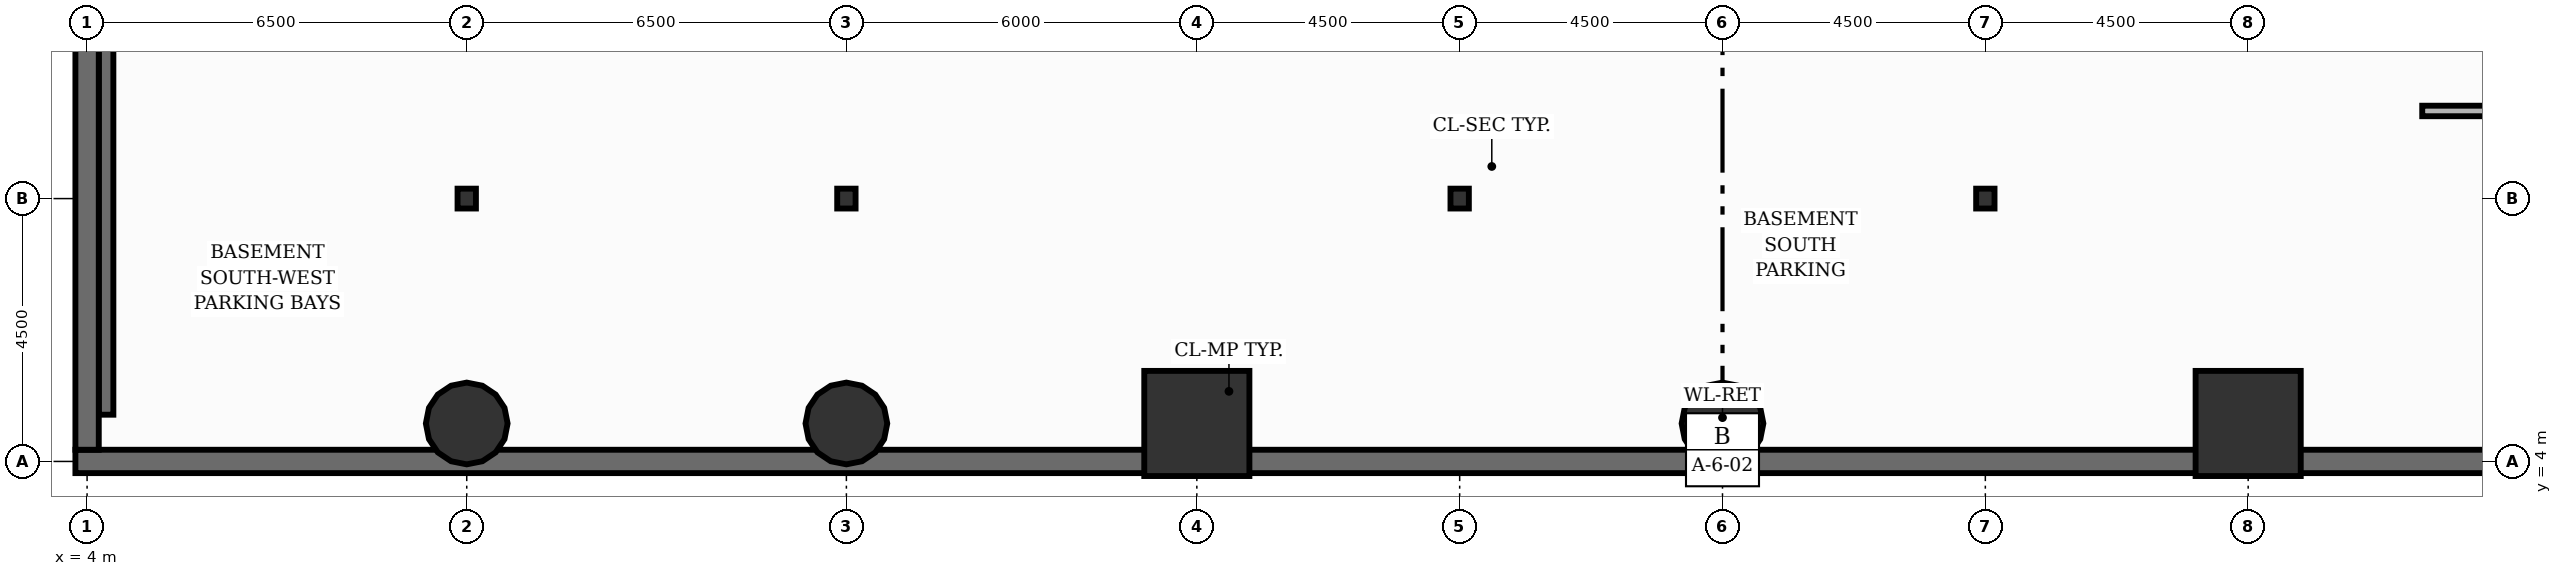
"""IFC4 building model, lengths in metres.
Left out: names, types, materials, properties, quantities, classifications, styles, units other than length and angle.
Written with IfcOpenShell. Run it as: python <this file> out.ifc"""

import sys

from ifc_helpers import new_model, si_unit, direction, frame, frame_2d, origin, origin_2d, place, context, subcontext, project, spatial, rectangle, circle, i_section, extrude, element, save


model = new_model("IFC4")
c1 = context("Model", 3, precision=1e-05, world=origin(), true_north=direction((0.0, 1.0)))
c2 = subcontext(c1, "Body", "Model", "MODEL_VIEW")
j1 = project(units=[si_unit("LENGTHUNIT", "METRE"), si_unit("PLANEANGLEUNIT", "RADIAN")], contexts=[c1])
p1 = place(None, origin())
s1 = spatial("IfcSite", under=j1, at=p1, CompositionType="ELEMENT")
p2 = place(p1, origin())
s2 = spatial("IfcBuilding", under=s1, at=p2, CompositionType="ELEMENT")
p3 = place(p2, frame((0.0, 0.0, -9.0)))
s3 = spatial("IfcBuildingStorey", under=s2, at=p3, CompositionType="ELEMENT", Elevation=-9.0)
p4 = place(p3, frame((4.325, 4.8, 0.0), z_axis=(0.0, 0.0, 1.0), x_axis=(0.0, 1.0, 0.0)))
e1 = element("IfcWall", 1, at=p4, inside=s3, PredefinedType="SHEAR", context=c2, shape_type="SweptSolid", body=[
    extrude(rectangle(XDim=37.9, YDim=0.25, at=frame_2d((18.95, 0.0))), origin(), (0.0, 0.0, 1.0), 4.5),
])
p5 = place(p3, frame((3.8, 4.0, 0.0), z_axis=(0.0, 0.0, 1.0), x_axis=(1.0, 0.0, 0.0)))
e2 = element("IfcWall", 2, at=p5, inside=s3, PredefinedType="USERDEFINED", context=c2, shape_type="SweptSolid", body=[
    extrude(rectangle(XDim=56.4, YDim=0.4, at=frame_2d((28.2, 0.0))), origin(), (0.0, 0.0, 1.0), 4.5),
])
p6 = place(p3, frame((4.0, 4.2, 0.0), z_axis=(0.0, 0.0, 1.0), x_axis=(0.0, 1.0, 0.0)))
e3 = element("IfcWall", 3, at=p6, inside=s3, PredefinedType="USERDEFINED", context=c2, shape_type="SweptSolid", body=[
    extrude(rectangle(XDim=39.6, YDim=0.4, at=frame_2d((19.8, 0.0))), origin(), (0.0, 0.0, 1.0), 4.5),
])
for number, where, z_axis, x_axis in (
    (4, (10.5, 4.65, 0.0), (0.0, 0.0, 1.0), (1.0, 0.0, 0.0)),
    (5, (17.0, 4.65, 0.0), (0.0, 0.0, 1.0), (1.0, 0.0, 0.0)),
):
    element("IfcColumn", number, at=place(p3, frame(where, z_axis=z_axis, x_axis=x_axis)), inside=s3, PredefinedType="COLUMN", context=c2, shape_type="SweptSolid", body=[
        extrude(circle(Radius=0.7, at=origin_2d()), origin(), (0.0, 0.0, 1.0), 4.5),
    ])
p7 = place(p3, frame((23.0, 4.65, 0.0), z_axis=(0.0, 0.0, 1.0), x_axis=(1.0, 0.0, 0.0)))
e6 = element("IfcColumn", 6, at=p7, inside=s3, PredefinedType="COLUMN", context=c2, shape_type="SweptSolid", body=[
    extrude(rectangle(XDim=1.8, YDim=1.8, at=origin_2d()), origin(), (0.0, 0.0, 1.0), 4.5),
])
p8 = place(p3, frame((32.0, 4.65, 0.0), z_axis=(0.0, 0.0, 1.0), x_axis=(1.0, 0.0, 0.0)))
e7 = element("IfcColumn", 7, at=p8, inside=s3, PredefinedType="COLUMN", context=c2, shape_type="SweptSolid", body=[
    extrude(circle(Radius=0.7, at=origin_2d()), origin(), (0.0, 0.0, 1.0), 4.5),
])
p9 = place(p3, frame((41.0, 4.65, 0.0), z_axis=(0.0, 0.0, 1.0), x_axis=(1.0, 0.0, 0.0)))
e8 = element("IfcColumn", 8, at=p9, inside=s3, PredefinedType="COLUMN", context=c2, shape_type="SweptSolid", body=[
    extrude(rectangle(XDim=1.8, YDim=1.8, at=origin_2d()), origin(), (0.0, 0.0, 1.0), 4.5),
])
for number, where, z_axis, x_axis in (
    (9, (27.5, 8.5, 0.0), (0.0, 0.0, 1.0), (1.0, 0.0, 0.0)),
    (10, (36.5, 8.5, 0.0), (0.0, 0.0, 1.0), (1.0, 0.0, 0.0)),
    (11, (10.5, 8.5, 0.0), (0.0, 0.0, 1.0), (1.0, 0.0, 0.0)),
    (12, (17.0, 8.5, 0.0), (0.0, 0.0, 1.0), (1.0, 0.0, 0.0)),
):
    element("IfcColumn", number, at=place(p3, frame(where, z_axis=z_axis, x_axis=x_axis)), inside=s3, PredefinedType="COLUMN", context=c2, shape_type="SweptSolid", body=[
        extrude(i_section(OverallWidth=0.314, OverallDepth=0.34, WebThickness=0.019, FlangeThickness=0.031, at=origin_2d()), origin(), (0.0, 0.0, 1.0), 4.5),
    ])
p10 = place(p3, frame((59.6, 10.0, 0.0), z_axis=(0.0, 0.0, 1.0), x_axis=(-1.0, 0.0, 0.0)))
e13 = element("IfcWall", 13, at=p10, inside=s3, PredefinedType="PARTITIONING", context=c2, shape_type="SweptSolid", body=[
    extrude(rectangle(XDim=15.62, YDim=0.18, at=frame_2d((7.81, 0.0))), origin(), (0.0, 0.0, 1.0), 4.195),
])
p11 = place(p10, frame((13.16, 0.0, 0.0)))
e14 = element("IfcOpeningElement", 14, at=p11, cuts=e13, PredefinedType="OPENING", context=c2, shape_type="SweptSolid", body=[
    extrude(rectangle(XDim=0.9, YDim=2.1, at=frame_2d((0.45, 1.05))), frame((0.0, 0.1, 0.0), z_axis=(0.0, -1.0, 0.0), x_axis=(1.0, 0.0, 0.0)), (0.0, 0.0, 1.0), 0.2),
])
p12 = place(p10, frame((1.75, 0.0, 0.0)))
e15 = element("IfcOpeningElement", 15, at=p12, cuts=e13, PredefinedType="OPENING", context=c2, shape_type="SweptSolid", body=[
    extrude(rectangle(XDim=0.9, YDim=2.1, at=frame_2d((0.45, 1.05))), frame((0.0, 0.1, 0.0), z_axis=(0.0, -1.0, 0.0), x_axis=(1.0, 0.0, 0.0)), (0.0, 0.0, 1.0), 0.2),
])
save(model, sys.argv[1])
